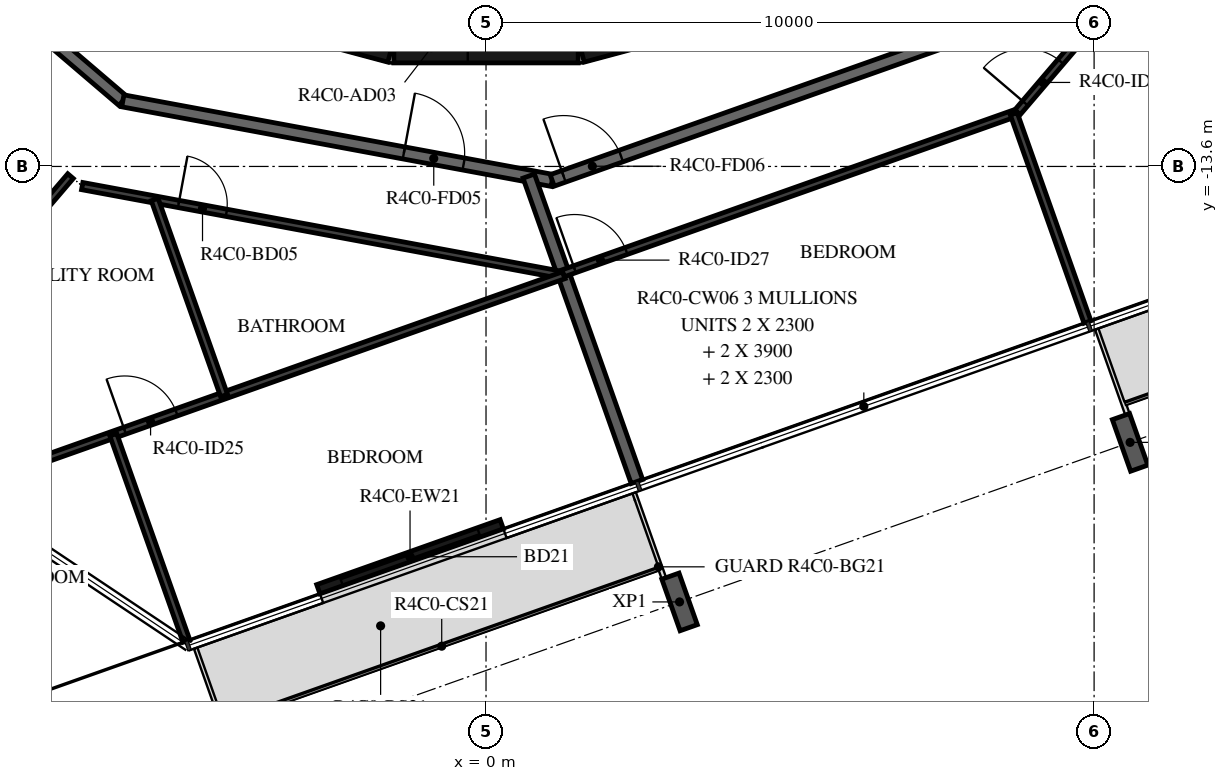
"""IFC4 building model, lengths in metres.
Left out: names, types, materials, properties, quantities, classifications, styles, units other than length and angle.
Written with IfcOpenShell. Run it as: python <this file> out.ifc"""

import sys

from ifc_helpers import new_model, si_unit, direction, frame, frame_2d, origin, origin_2d, place, context, subcontext, project, spatial, rectangle, i_section, extrude, element, fill, save


model = new_model("IFC4")
c1 = context("Model", 3, precision=1e-05, world=origin(), true_north=direction((0.0, 1.0)))
c2 = subcontext(c1, "Body", "Model", "MODEL_VIEW")
j1 = project(units=[si_unit("LENGTHUNIT", "METRE"), si_unit("PLANEANGLEUNIT", "RADIAN")], contexts=[c1])
p1 = place(None, origin())
s1 = spatial("IfcSite", under=j1, at=p1, CompositionType="ELEMENT")
p2 = place(p1, origin())
s2 = spatial("IfcBuilding", under=s1, at=p2, CompositionType="ELEMENT")
p3 = place(p2, frame((0.0, 0.0, 179.7)))
s3 = spatial("IfcBuildingStorey", under=s2, at=p3, CompositionType="ELEMENT", Elevation=179.7)
for number, where, z_axis, x_axis in (
    (1, (10.592, -18.138, -0.38), (0.0, 0.0, 1.0), (-0.943, -0.334, 0.0)),
    (2, (3.183, -20.761, -0.38), (0.0, 0.0, 1.0), (-0.943, -0.334, 0.0)),
):
    element("IfcColumn", number, at=place(p3, frame(where, z_axis=z_axis, x_axis=x_axis)), inside=s3, PredefinedType="COLUMN", context=c2, shape_type="SweptSolid", body=[
        extrude(i_section(OverallWidth=0.3, OverallDepth=0.9, WebThickness=0.019, FlangeThickness=0.035, FilletRadius=0.03, at=origin_2d()), origin(), (0.0, 0.0, 1.0), 2.616),
    ])
p4 = place(p3, frame((-2.758, -20.552, 0.0), z_axis=(0.0, 0.0, 1.0), x_axis=(0.94265323131, 0.333773704029, 0.0)))
e3 = element("IfcWall", 3, at=p4, inside=s3, PredefinedType="STANDARD", context=c2, shape_type="SweptSolid", body=[
    extrude(rectangle(XDim=3.2, YDim=0.16, at=frame_2d((1.6, 0.0))), origin(), (0.0, 0.0, 1.0), 3.05),
])
p5 = place(p4, frame((0.4, 0.0, 0.0)))
e4 = element("IfcOpeningElement", 4, at=p5, cuts=e3, PredefinedType="OPENING", context=c2, shape_type="SweptSolid", body=[
    extrude(rectangle(XDim=2.4, YDim=2.4, at=frame_2d((1.2, 1.2))), frame((0.0, 0.09, 0.0), z_axis=(0.0, -1.0, 0.0), x_axis=(1.0, 0.0, 0.0)), (0.0, 0.0, 1.0), 0.18),
])
for number, where, z_axis, x_axis in (
    (5, (1.55, -11.643, 0.0), (0.0, 0.0, 1.0), (0.966, 0.259, 0.0)),
    (6, (-4.479, -10.858, 0.0), (0.0, 0.0, 1.0), (0.966, -0.259, 0.0)),
):
    element("IfcWall", number, at=place(p3, frame(where, z_axis=z_axis, x_axis=x_axis)), inside=s3, PredefinedType="SHEAR", context=c2, shape_type="SweptSolid", body=[
        extrude(rectangle(XDim=3.033, YDim=0.5, at=frame_2d((1.516, 0.0))), origin(), (0.0, 0.0, 1.0), 3.05),
    ])
p6 = place(p3, frame((-1.516, -11.647, 0.0), z_axis=(0.0, 0.0, 1.0), x_axis=(1.0, 0.0, 0.0)))
e7 = element("IfcWall", 7, at=p6, inside=s3, PredefinedType="SHEAR", context=c2, shape_type="SweptSolid", body=[
    extrude(rectangle(XDim=3.033, YDim=0.5, at=frame_2d((1.516, 0.0))), origin(), (0.0, 0.0, 1.0), 3.05),
])
p7 = place(p6, frame((0.016, 0.0, 0.0)))
e8 = element("IfcOpeningElement", 8, at=p7, cuts=e7, PredefinedType="OPENING", context=c2, shape_type="SweptSolid", body=[
    extrude(rectangle(XDim=1.2, YDim=2.1, at=frame_2d((0.6, 1.05))), frame((0.0, 0.26, 0.0), z_axis=(0.0, -1.0, 0.0), x_axis=(1.0, 0.0, 0.0)), (0.0, 0.0, 1.0), 0.52),
])
p8 = place(p3, frame((-11.433, -7.858, 0.0), z_axis=(0.0, 0.0, 1.0), x_axis=(0.760412154545, -0.649440801937, 0.0)))
e9 = element("IfcWall", 9, at=p8, inside=s3, PredefinedType="STANDARD", context=c2, shape_type="SweptSolid", body=[
    extrude(rectangle(XDim=7.181, YDim=0.2, at=frame_2d((3.59, 0.0))), origin(), (0.0, 0.0, 1.0), 3.05),
])
p9 = place(p8, frame((2.39, 0.0, 0.0)))
e10 = element("IfcOpeningElement", 10, at=p9, cuts=e9, PredefinedType="OPENING", context=c2, shape_type="SweptSolid", body=[
    extrude(rectangle(XDim=1.0, YDim=2.1, at=frame_2d((0.5, 1.05))), frame((0.0, 0.11, 0.0), z_axis=(0.0, -1.0, 0.0), x_axis=(1.0, 0.0, 0.0)), (0.0, 0.0, 1.0), 0.22),
])
p10 = place(p3, frame((-5.972, -12.521, 0.0), z_axis=(0.0, 0.0, 1.0), x_axis=(0.983256068163, -0.18222926335, 0.0)))
e11 = element("IfcWall", 11, at=p10, inside=s3, PredefinedType="STANDARD", context=c2, shape_type="SweptSolid", body=[
    extrude(rectangle(XDim=7.181, YDim=0.2, at=frame_2d((3.59, 0.0))), origin(), (0.0, 0.0, 1.0), 3.05),
])
p11 = place(p10, frame((4.7, 0.0, 0.0)))
e12 = element("IfcOpeningElement", 12, at=p11, cuts=e11, PredefinedType="OPENING", context=c2, shape_type="SweptSolid", body=[
    extrude(rectangle(XDim=1.0, YDim=2.1, at=frame_2d((0.5, 1.05))), frame((0.0, 0.11, 0.0), z_axis=(0.0, -1.0, 0.0), x_axis=(1.0, 0.0, 0.0)), (0.0, 0.0, 1.0), 0.22),
])
p12 = place(p3, frame((1.088, -13.83, 0.0), z_axis=(0.0, 0.0, 1.0), x_axis=(0.942648397945, 0.333787354241, 0.0)))
e13 = element("IfcWall", 13, at=p12, inside=s3, PredefinedType="STANDARD", context=c2, shape_type="SweptSolid", body=[
    extrude(rectangle(XDim=7.181, YDim=0.2, at=frame_2d((3.591, 0.0))), origin(), (0.0, 0.0, 1.0), 3.05),
])
p13 = place(p12, frame((0.2, 0.0, 0.0)))
e14 = element("IfcOpeningElement", 14, at=p13, cuts=e13, PredefinedType="OPENING", context=c2, shape_type="SweptSolid", body=[
    extrude(rectangle(XDim=1.0, YDim=2.1, at=frame_2d((0.5, 1.05))), frame((0.0, 0.11, 0.0), z_axis=(0.0, -1.0, 0.0), x_axis=(1.0, 0.0, 0.0)), (0.0, 0.0, 1.0), 0.22),
])
p14 = place(p3, frame((2.482, -18.782, 0.0), z_axis=(0.0, 0.0, 1.0), x_axis=(-0.333807281402, 0.942641341594, 0.0)))
e15 = element("IfcWall", 15, at=p14, inside=s3, PredefinedType="STANDARD", context=c2, shape_type="SweptSolid", body=[
    extrude(rectangle(XDim=5.329, YDim=0.2, at=frame_2d((2.665, 0.0))), origin(), (0.0, 0.0, 1.0), 3.05),
])
p15 = place(p3, frame((-9.573, -16.968, 0.0), z_axis=(0.0, 0.0, 1.0), x_axis=(0.649437062208, 0.760415348498, 0.0)))
e16 = element("IfcWall", 16, at=p15, inside=s3, PredefinedType="PARTITIONING", context=c2, shape_type="SweptSolid", body=[
    extrude(rectangle(XDim=4.219, YDim=0.12, at=frame_2d((2.11, 0.0))), origin(), (0.0, 0.0, 1.0), 3.05),
])
p16 = place(p3, frame((-6.641, -13.923, 0.0), z_axis=(0.0, 0.0, 1.0), x_axis=(0.983250157272, -0.182261153912, 0.0)))
e17 = element("IfcWall", 17, at=p16, inside=s3, PredefinedType="PARTITIONING", context=c2, shape_type="SweptSolid", body=[
    extrude(rectangle(XDim=7.985, YDim=0.12, at=frame_2d((3.992, 0.0))), origin(), (0.0, 0.0, 1.0), 3.05),
])
p17 = place(p16, frame((1.612, 0.0, 0.0)))
e18 = element("IfcOpeningElement", 18, at=p17, cuts=e17, PredefinedType="OPENING", context=c2, shape_type="SweptSolid", body=[
    extrude(rectangle(XDim=0.8, YDim=2.1, at=frame_2d((0.4, 1.05))), frame((0.0, 0.07, 0.0), z_axis=(0.0, -1.0, 0.0), x_axis=(1.0, 0.0, 0.0)), (0.0, 0.0, 1.0), 0.14),
])
p18 = place(p3, frame((-12.015, -20.096, 0.0), z_axis=(0.0, 0.0, 1.0), x_axis=(0.942638913957, 0.33381413675, 0.0)))
e19 = element("IfcWall", 19, at=p18, inside=s3, PredefinedType="PARTITIONING", context=c2, shape_type="SweptSolid", body=[
    extrude(rectangle(XDim=14.104, YDim=0.12, at=frame_2d((7.052, 0.0))), origin(), (0.0, 0.0, 1.0), 3.05),
])
p19 = place(p18, frame((2.814, 0.0, 0.0)))
e20 = element("IfcOpeningElement", 20, at=p19, cuts=e19, PredefinedType="OPENING", context=c2, shape_type="SweptSolid", body=[
    extrude(rectangle(XDim=0.9, YDim=2.1, at=frame_2d((0.45, 1.05))), frame((0.0, 0.07, 0.0), z_axis=(0.0, -1.0, 0.0), x_axis=(1.0, 0.0, 0.0)), (0.0, 0.0, 1.0), 0.14),
])
p20 = place(p18, frame((6.444, 0.0, 0.0)))
e21 = element("IfcOpeningElement", 21, at=p20, cuts=e19, PredefinedType="OPENING", context=c2, shape_type="SweptSolid", body=[
    extrude(rectangle(XDim=0.9, YDim=2.1, at=frame_2d((0.45, 1.05))), frame((0.0, 0.07, 0.0), z_axis=(0.0, -1.0, 0.0), x_axis=(1.0, 0.0, 0.0)), (0.0, 0.0, 1.0), 0.14),
])
p21 = place(p18, frame((0.2, 0.0, 0.0)))
e22 = element("IfcOpeningElement", 22, at=p21, cuts=e19, PredefinedType="OPENING", context=c2, shape_type="SweptSolid", body=[
    extrude(rectangle(XDim=0.9, YDim=2.1, at=frame_2d((0.45, 1.05))), frame((0.0, 0.07, 0.0), z_axis=(0.0, -1.0, 0.0), x_axis=(1.0, 0.0, 0.0)), (0.0, 0.0, 1.0), 0.14),
])
p22 = place(p3, frame((-4.308, -17.367, 0.0), z_axis=(0.0, 0.0, 1.0), x_axis=(-0.333802202677, 0.942643140052, 0.0)))
e23 = element("IfcWall", 23, at=p22, inside=s3, PredefinedType="PARTITIONING", context=c2, shape_type="SweptSolid", body=[
    extrude(rectangle(XDim=3.419, YDim=0.12, at=frame_2d((1.709, 0.0))), origin(), (0.0, 0.0, 1.0), 3.05),
])
p23 = place(p3, frame((-4.927, -21.406, 0.0), z_axis=(0.0, 0.0, 1.0), x_axis=(-0.333813244781, 0.942639229827, 0.0)))
e24 = element("IfcWall", 24, at=p23, inside=s3, PredefinedType="PARTITIONING", context=c2, shape_type="SweptSolid", body=[
    extrude(rectangle(XDim=3.6, YDim=0.12, at=frame_2d((1.8, 0.0))), origin(), (0.0, 0.0, 1.0), 3.05),
])
p24 = place(p3, frame((1.269, -15.357, 0.0), z_axis=(0.0, 0.0, 1.0), x_axis=(0.942639442898, 0.333812643101, 0.0)))
e25 = element("IfcWall", 25, at=p24, inside=s3, PredefinedType="PARTITIONING", context=c2, shape_type="SweptSolid", body=[
    extrude(rectangle(XDim=7.86, YDim=0.12, at=frame_2d((3.93, 0.0))), origin(), (0.0, 0.0, 1.0), 3.05),
])
p25 = place(p24, frame((0.2, 0.0, 0.0)))
e26 = element("IfcOpeningElement", 26, at=p25, cuts=e25, PredefinedType="OPENING", context=c2, shape_type="SweptSolid", body=[
    extrude(rectangle(XDim=0.9, YDim=2.1, at=frame_2d((0.45, 1.05))), frame((0.0, 0.07, 0.0), z_axis=(0.0, -1.0, 0.0), x_axis=(1.0, 0.0, 0.0)), (0.0, 0.0, 1.0), 0.14),
])
p26 = place(p3, frame((8.737, -12.713, 0.0), z_axis=(0.0, 0.0, 1.0), x_axis=(0.649427973074, 0.760423111031, 0.0)))
e27 = element("IfcWall", 27, at=p26, inside=s3, PredefinedType="PARTITIONING", context=c2, shape_type="SweptSolid", body=[
    extrude(rectangle(XDim=7.571, YDim=0.12, at=frame_2d((3.785, 0.0))), origin(), (0.0, 0.0, 1.0), 3.05),
])
p27 = place(p26, frame((0.2, 0.0, 0.0)))
e28 = element("IfcOpeningElement", 28, at=p27, cuts=e27, PredefinedType="OPENING", context=c2, shape_type="SweptSolid", body=[
    extrude(rectangle(XDim=0.9, YDim=2.1, at=frame_2d((0.45, 1.05))), frame((0.0, 0.07, 0.0), z_axis=(0.0, -1.0, 0.0), x_axis=(1.0, 0.0, 0.0)), (0.0, 0.0, 1.0), 0.14),
])
p28 = place(p26, frame((4.634, 0.0, 0.0)))
e29 = element("IfcOpeningElement", 29, at=p28, cuts=e27, PredefinedType="OPENING", context=c2, shape_type="SweptSolid", body=[
    extrude(rectangle(XDim=0.8, YDim=2.1, at=frame_2d((0.4, 1.05))), frame((0.0, 0.07, 0.0), z_axis=(0.0, -1.0, 0.0), x_axis=(1.0, 0.0, 0.0)), (0.0, 0.0, 1.0), 0.14),
])
p29 = place(p3, frame((9.891, -16.158, 0.0), z_axis=(0.0, 0.0, 1.0), x_axis=(-0.33385336213, 0.942625022262, 0.0)))
e30 = element("IfcWall", 30, at=p29, inside=s3, PredefinedType="PARTITIONING", context=c2, shape_type="SweptSolid", body=[
    extrude(rectangle(XDim=3.633, YDim=0.12, at=frame_2d((1.816, 0.0))), origin(), (0.0, 0.0, 1.0), 3.05),
])
p30 = place(p5, origin())
e31 = element("IfcDoor", 31, at=p30, inside=s3, OperationType="DOUBLE_DOOR_SLIDING", PredefinedType="DOOR", context=c2, shape_type="SweptSolid", body=[
    extrude(rectangle(XDim=2.4, YDim=2.4, at=frame_2d((1.2, 1.2))), frame((0.0, 0.025, 0.0), z_axis=(0.0, -1.0, 0.0), x_axis=(1.0, 0.0, 0.0)), (0.0, 0.0, 1.0), 0.05),
])
fill(e4, e31)
p31 = place(p11, origin())
e32 = element("IfcDoor", 32, at=p31, inside=s3, OperationType="SINGLE_SWING_LEFT", PredefinedType="DOOR", context=c2, shape_type="SweptSolid", body=[
    extrude(rectangle(XDim=1.0, YDim=2.1, at=frame_2d((0.5, 1.05))), frame((0.0, 0.025, 0.0), z_axis=(0.0, -1.0, 0.0), x_axis=(1.0, 0.0, 0.0)), (0.0, 0.0, 1.0), 0.05),
])
fill(e12, e32)
p32 = place(p17, origin())
e33 = element("IfcDoor", 33, at=p32, inside=s3, OperationType="SINGLE_SWING_LEFT", PredefinedType="DOOR", context=c2, shape_type="SweptSolid", body=[
    extrude(rectangle(XDim=0.8, YDim=2.1, at=frame_2d((0.4, 1.05))), frame((0.0, 0.025, 0.0), z_axis=(0.0, -1.0, 0.0), x_axis=(1.0, 0.0, 0.0)), (0.0, 0.0, 1.0), 0.05),
])
fill(e18, e33)
p33 = place(p20, origin())
e34 = element("IfcDoor", 34, at=p33, inside=s3, OperationType="SINGLE_SWING_LEFT", PredefinedType="DOOR", context=c2, shape_type="SweptSolid", body=[
    extrude(rectangle(XDim=0.9, YDim=2.1, at=frame_2d((0.45, 1.05))), frame((0.0, 0.025, 0.0), z_axis=(0.0, -1.0, 0.0), x_axis=(1.0, 0.0, 0.0)), (0.0, 0.0, 1.0), 0.05),
])
fill(e21, e34)
p34 = place(p13, origin())
e35 = element("IfcDoor", 35, at=p34, inside=s3, OperationType="SINGLE_SWING_LEFT", PredefinedType="DOOR", context=c2, shape_type="SweptSolid", body=[
    extrude(rectangle(XDim=1.0, YDim=2.1, at=frame_2d((0.5, 1.05))), frame((0.0, 0.025, 0.0), z_axis=(0.0, -1.0, 0.0), x_axis=(1.0, 0.0, 0.0)), (0.0, 0.0, 1.0), 0.05),
])
fill(e14, e35)
p35 = place(p25, origin())
e36 = element("IfcDoor", 36, at=p35, inside=s3, OperationType="SINGLE_SWING_LEFT", PredefinedType="DOOR", context=c2, shape_type="SweptSolid", body=[
    extrude(rectangle(XDim=0.9, YDim=2.1, at=frame_2d((0.45, 1.05))), frame((0.0, 0.025, 0.0), z_axis=(0.0, -1.0, 0.0), x_axis=(1.0, 0.0, 0.0)), (0.0, 0.0, 1.0), 0.05),
])
fill(e26, e36)
p36 = place(p27, origin())
e37 = element("IfcDoor", 37, at=p36, inside=s3, OperationType="SINGLE_SWING_RIGHT", PredefinedType="DOOR", context=c2, shape_type="SweptSolid", body=[
    extrude(rectangle(XDim=0.9, YDim=2.1, at=frame_2d((0.45, 1.05))), frame((0.0, 0.025, 0.0), z_axis=(0.0, -1.0, 0.0), x_axis=(1.0, 0.0, 0.0)), (0.0, 0.0, 1.0), 0.05),
])
fill(e28, e37)
save(model, sys.argv[1])
